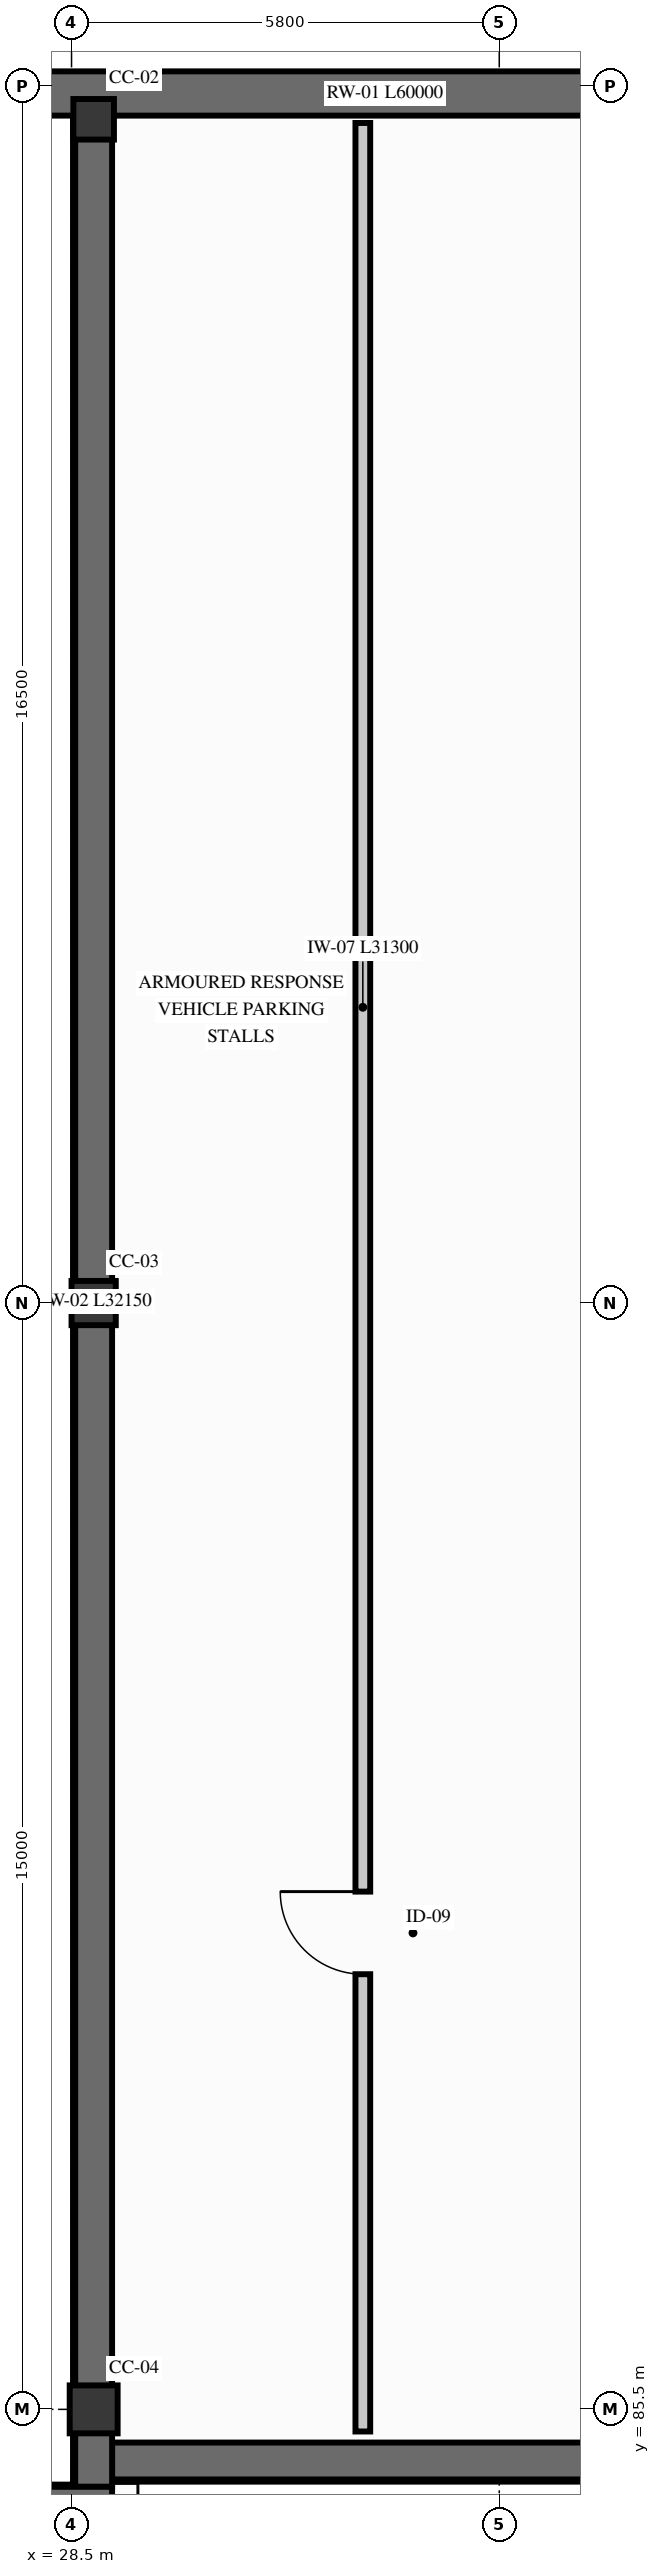
"""IFC4 building model, lengths in metres.
Left out: names, types, materials, properties, quantities, classifications, styles, units other than length and angle.
Written with IfcOpenShell. Run it as: python <this file> out.ifc"""

import sys

from ifc_helpers import new_model, si_unit, direction, frame, frame_2d, origin, origin_2d, place, context, subcontext, project, spatial, rectangle, extrude, element, fill, save


model = new_model("IFC4")
c1 = context("Model", 3, precision=1e-05, world=origin(), true_north=direction((0.0, 1.0)))
c2 = subcontext(c1, "Body", "Model", "MODEL_VIEW")
j1 = project(units=[si_unit("LENGTHUNIT", "METRE"), si_unit("PLANEANGLEUNIT", "RADIAN")], contexts=[c1])
p1 = place(None, origin())
s1 = spatial("IfcSite", under=j1, at=p1, CompositionType="ELEMENT")
p2 = place(p1, origin())
s2 = spatial("IfcBuilding", under=s1, at=p2, CompositionType="ELEMENT")
p3 = place(p2, frame((0.0, 0.0, -4.2)))
s3 = spatial("IfcBuildingStorey", under=s2, at=p3, CompositionType="ELEMENT", Elevation=-4.2)
p4 = place(p3, frame((4.5, 116.9, 0.0), z_axis=(0.0, 0.0, 1.0), x_axis=(1.0, 0.0, 0.0)))
e1 = element("IfcWall", 1, at=p4, inside=s3, PredefinedType="USERDEFINED", context=c2, shape_type="SweptSolid", body=[
    extrude(rectangle(XDim=60.0, YDim=0.6, at=frame_2d((30.0, 0.0))), origin(), (0.0, 0.0, 1.0), 3.94),
])
p5 = place(p3, frame((29.05, 84.8, 0.0), z_axis=(0.0, 0.0, 1.0), x_axis=(1.0, 0.0, 0.0)))
e2 = element("IfcWall", 2, at=p5, inside=s3, PredefinedType="USERDEFINED", context=c2, shape_type="SweptSolid", body=[
    extrude(rectangle(XDim=87.95, YDim=0.5, at=frame_2d((43.975, 0.0))), origin(), (0.0, 0.0, 1.0), 3.94),
])
p6 = place(p5, frame((55.8, 0.0, 0.0)))
e3 = element("IfcOpeningElement", 3, at=p6, cuts=e2, PredefinedType="OPENING", context=c2, shape_type="SweptSolid", body=[
    extrude(rectangle(XDim=1.18, YDim=2.24, at=frame_2d((0.59, 1.12))), frame((0.0, 0.26, 0.0), z_axis=(0.0, -1.0, 0.0), x_axis=(1.0, 0.0, 0.0)), (0.0, 0.0, 1.0), 0.52),
])
p7 = place(p3, frame((28.8, 84.45, 0.0), z_axis=(0.0, 0.0, 1.0), x_axis=(0.0, 1.0, 0.0)))
e4 = element("IfcWall", 4, at=p7, inside=s3, PredefinedType="USERDEFINED", context=c2, shape_type="SweptSolid", body=[
    extrude(rectangle(XDim=32.15, YDim=0.5, at=frame_2d((16.075, 0.0))), origin(), (0.0, 0.0, 1.0), 3.94),
])
p8 = place(p3, frame((5.1, 84.2, 0.0), z_axis=(0.0, 0.0, 1.0), x_axis=(1.0, 0.0, 0.0)))
e5 = element("IfcWall", 5, at=p8, inside=s3, PredefinedType="USERDEFINED", context=c2, shape_type="SweptSolid", body=[
    extrude(rectangle(XDim=23.95, YDim=0.5, at=frame_2d((11.975, 0.0))), origin(), (0.0, 0.0, 1.0), 3.94),
])
p9 = place(p3, frame((28.8, 85.5, 0.0), z_axis=(0.0, 0.0, 1.0), x_axis=(1.0, 0.0, 0.0)))
e6 = element("IfcColumn", 6, at=p9, inside=s3, PredefinedType="COLUMN", context=c2, shape_type="SweptSolid", body=[
    extrude(rectangle(XDim=0.65, YDim=0.65, at=origin_2d()), origin(), (0.0, 0.0, 1.0), 4.2),
])
p10 = place(p3, frame((28.8, 100.5, 0.0), z_axis=(0.0, 0.0, 1.0), x_axis=(1.0, 0.0, 0.0)))
e7 = element("IfcColumn", 7, at=p10, inside=s3, PredefinedType="COLUMN", context=c2, shape_type="SweptSolid", body=[
    extrude(rectangle(XDim=0.6, YDim=0.6, at=origin_2d()), origin(), (0.0, 0.0, 1.0), 4.2),
])
p11 = place(p3, frame((28.8, 116.55, 0.0), z_axis=(0.0, 0.0, 1.0), x_axis=(1.0, 0.0, 0.0)))
e8 = element("IfcColumn", 8, at=p11, inside=s3, PredefinedType="COLUMN", context=c2, shape_type="SweptSolid", body=[
    extrude(rectangle(XDim=0.55, YDim=0.55, at=origin_2d()), origin(), (0.0, 0.0, 1.0), 4.2),
])
p12 = place(p3, frame((32.45, 85.2, 0.0), z_axis=(0.0, 0.0, 1.0), x_axis=(0.0, 1.0, 0.0)))
e9 = element("IfcWall", 9, at=p12, inside=s3, PredefinedType="PARTITIONING", context=c2, shape_type="SweptSolid", body=[
    extrude(rectangle(XDim=31.3, YDim=0.2, at=frame_2d((15.65, 0.0))), origin(), (0.0, 0.0, 1.0), 3.068),
])
p13 = place(p12, frame((6.2, 0.0, 0.0)))
e10 = element("IfcOpeningElement", 10, at=p13, cuts=e9, PredefinedType="OPENING", context=c2, shape_type="SweptSolid", body=[
    extrude(rectangle(XDim=1.12, YDim=2.2, at=frame_2d((0.56, 1.1))), frame((0.0, 0.11, 0.0), z_axis=(0.0, -1.0, 0.0), x_axis=(1.0, 0.0, 0.0)), (0.0, 0.0, 1.0), 0.22),
])
p14 = place(p13, origin())
e11 = element("IfcDoor", 11, at=p14, inside=s3, OperationType="SINGLE_SWING_RIGHT", PredefinedType="DOOR", context=c2, shape_type="SweptSolid", body=[
    extrude(rectangle(XDim=1.12, YDim=2.2, at=frame_2d((0.56, 1.1))), frame((0.0, 0.025, 0.0), z_axis=(0.0, -1.0, 0.0), x_axis=(1.0, 0.0, 0.0)), (0.0, 0.0, 1.0), 0.05),
])
fill(e10, e11)
save(model, sys.argv[1])
